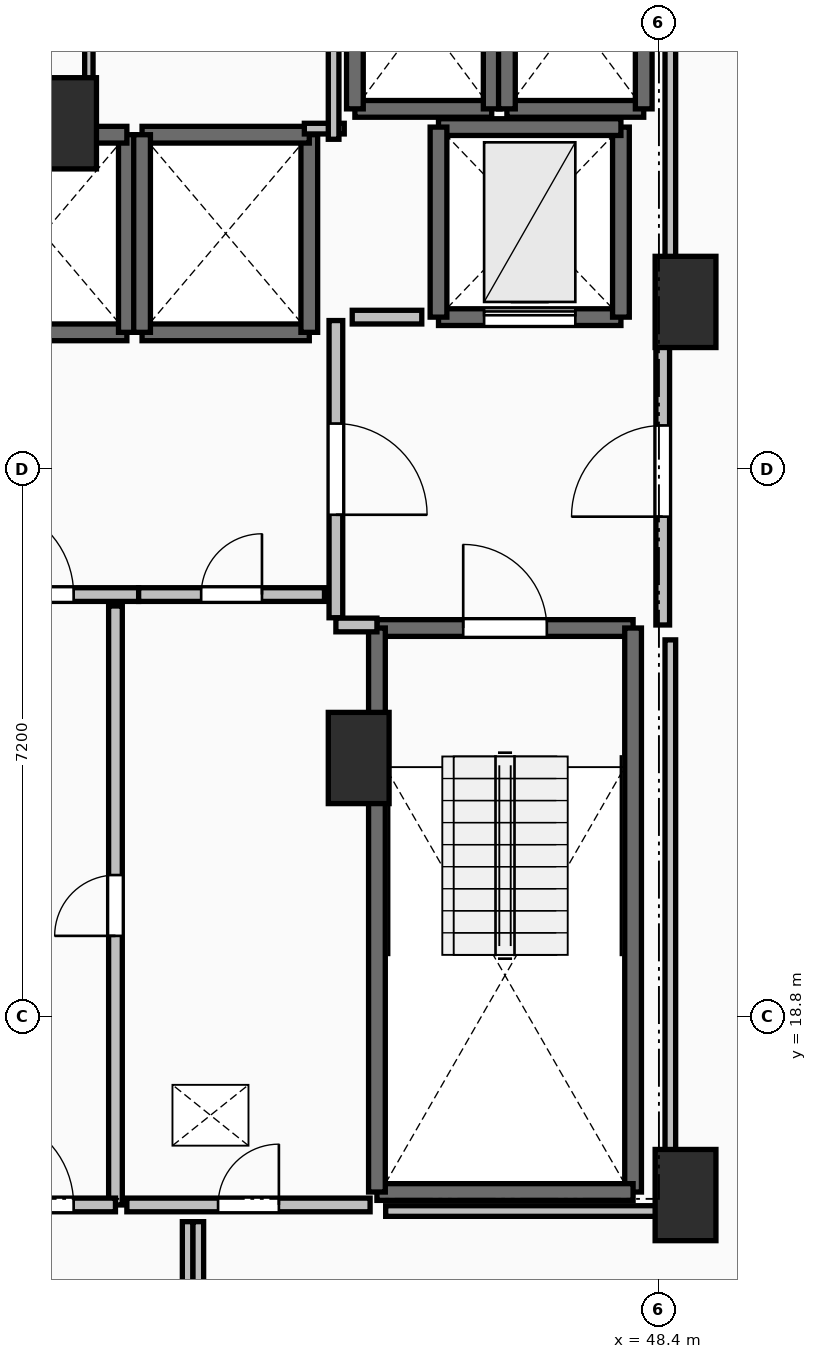
"""IFC4 building model, lengths in metres.
Left out: names, types, materials, properties, quantities, classifications, styles, units other than length and angle.
Written with IfcOpenShell. Run it as: python <this file> out.ifc"""

import sys

from ifc_helpers import new_model, si_unit, direction, frame, frame_2d, origin, origin_2d, place, context, subcontext, project, spatial, rectangle, extrude, element, fill, save


model = new_model("IFC4")
c1 = context("Model", 3, precision=1e-05, world=origin(), true_north=direction((0.0, 1.0)))
c2 = subcontext(c1, "Body", "Model", "MODEL_VIEW")
j1 = project(units=[si_unit("LENGTHUNIT", "METRE"), si_unit("PLANEANGLEUNIT", "RADIAN")], contexts=[c1])
p1 = place(None, origin())
s1 = spatial("IfcSite", under=j1, at=p1, CompositionType="ELEMENT")
p2 = place(p1, origin())
s2 = spatial("IfcBuilding", under=s1, at=p2, CompositionType="ELEMENT")
p3 = place(p2, frame((0.0, 0.0, 171.1)))
s3 = spatial("IfcBuildingStorey", under=s2, at=p3, CompositionType="ELEMENT", Elevation=171.1)
for number, where, z_axis, x_axis in (
    (1, (48.75, 28.2, 0.0), (0.0, 0.0, 1.0), (1.0, 0.0, 0.0)),
    (2, (48.75, 16.45, 0.0), (0.0, 0.0, 1.0), (1.0, 0.0, 0.0)),
    (3, (44.45, 22.2, 0.0), (0.0, 0.0, 1.0), (1.0, 0.0, 0.0)),
    (4, (40.6, 30.55, 0.0), (0.0, 0.0, 1.0), (1.0, 0.0, 0.0)),
):
    element("IfcColumn", number, at=place(p3, frame(where, z_axis=z_axis, x_axis=x_axis)), inside=s3, PredefinedType="PILASTER", context=c2, shape_type="SweptSolid", body=[
        extrude(rectangle(XDim=0.8, YDim=1.2, at=origin_2d()), origin(), (0.0, 0.0, 1.0), 3.5),
    ])
p4 = place(p3, frame((44.69, 23.91, 0.0), z_axis=(0.0, 0.0, 1.0), x_axis=(1.0, 0.0, 0.0)))
e5 = element("IfcWall", 5, at=p4, inside=s3, PredefinedType="SOLIDWALL", context=c2, shape_type="SweptSolid", body=[
    extrude(rectangle(XDim=3.37, YDim=0.22, at=frame_2d((1.685, 0.0))), origin(), (0.0, 0.0, 1.0), 3.2),
])
p5 = place(p4, frame((1.135, 0.0, 0.0)))
e6 = element("IfcOpeningElement", 6, at=p5, cuts=e5, PredefinedType="OPENING", context=c2, shape_type="SweptSolid", body=[
    extrude(rectangle(XDim=1.1, YDim=2.15, at=frame_2d((0.55, 1.075))), frame((0.0, 0.125, 0.0), z_axis=(0.0, -1.0, 0.0), x_axis=(1.0, 0.0, 0.0)), (0.0, 0.0, 1.0), 0.25),
])
p6 = place(p3, frame((48.06, 23.91, 0.0), z_axis=(0.0, 0.0, 1.0), x_axis=(0.0, -1.0, 0.0)))
e7 = element("IfcWall", 7, at=p6, inside=s3, PredefinedType="SOLIDWALL", context=c2, shape_type="SweptSolid", body=[
    extrude(rectangle(XDim=7.42, YDim=0.22, at=frame_2d((3.71, 0.0))), origin(), (0.0, 0.0, 1.0), 3.2),
])
p7 = place(p3, frame((48.06, 16.49, 0.0), z_axis=(0.0, 0.0, 1.0), x_axis=(-1.0, 0.0, 0.0)))
e8 = element("IfcWall", 8, at=p7, inside=s3, PredefinedType="SOLIDWALL", context=c2, shape_type="SweptSolid", body=[
    extrude(rectangle(XDim=3.37, YDim=0.22, at=frame_2d((1.685, 0.0))), origin(), (0.0, 0.0, 1.0), 3.2),
])
p8 = place(p3, frame((44.69, 16.49, 0.0), z_axis=(0.0, 0.0, 1.0), x_axis=(0.0, 1.0, 0.0)))
e9 = element("IfcWall", 9, at=p8, inside=s3, PredefinedType="SOLIDWALL", context=c2, shape_type="SweptSolid", body=[
    extrude(rectangle(XDim=7.42, YDim=0.22, at=frame_2d((3.71, 0.0))), origin(), (0.0, 0.0, 1.0), 3.2),
])
p9 = place(p3, frame((39.2, 27.8, 0.0), z_axis=(0.0, 0.0, 1.0), x_axis=(1.0, 0.0, 0.0)))
e10 = element("IfcWall", 10, at=p9, inside=s3, PredefinedType="SOLIDWALL", context=c2, shape_type="SweptSolid", body=[
    extrude(rectangle(XDim=2.2, YDim=0.22, at=frame_2d((1.1, 0.0))), origin(), (0.0, 0.0, 1.0), 3.2),
])
p10 = place(p3, frame((41.4, 27.8, 0.0), z_axis=(0.0, 0.0, 1.0), x_axis=(0.0, 1.0, 0.0)))
e11 = element("IfcWall", 11, at=p10, inside=s3, PredefinedType="SOLIDWALL", context=c2, shape_type="SweptSolid", body=[
    extrude(rectangle(XDim=2.6, YDim=0.22, at=frame_2d((1.3, 0.0))), origin(), (0.0, 0.0, 1.0), 3.2),
])
for number, where, z_axis, x_axis in (
    (12, (41.4, 30.4, 0.0), (0.0, 0.0, 1.0), (-1.0, 0.0, 0.0)),
    (13, (41.6, 27.8, 0.0), (0.0, 0.0, 1.0), (1.0, 0.0, 0.0)),
):
    element("IfcWall", number, at=place(p3, frame(where, z_axis=z_axis, x_axis=x_axis)), inside=s3, PredefinedType="SOLIDWALL", context=c2, shape_type="SweptSolid", body=[
        extrude(rectangle(XDim=2.2, YDim=0.22, at=frame_2d((1.1, 0.0))), origin(), (0.0, 0.0, 1.0), 3.2),
    ])
p11 = place(p3, frame((43.8, 27.8, 0.0), z_axis=(0.0, 0.0, 1.0), x_axis=(0.0, 1.0, 0.0)))
e14 = element("IfcWall", 14, at=p11, inside=s3, PredefinedType="SOLIDWALL", context=c2, shape_type="SweptSolid", body=[
    extrude(rectangle(XDim=2.6, YDim=0.22, at=frame_2d((1.3, 0.0))), origin(), (0.0, 0.0, 1.0), 3.2),
])
p12 = place(p3, frame((43.8, 30.4, 0.0), z_axis=(0.0, 0.0, 1.0), x_axis=(-1.0, 0.0, 0.0)))
e15 = element("IfcWall", 15, at=p12, inside=s3, PredefinedType="SOLIDWALL", context=c2, shape_type="SweptSolid", body=[
    extrude(rectangle(XDim=2.2, YDim=0.22, at=frame_2d((1.1, 0.0))), origin(), (0.0, 0.0, 1.0), 3.2),
])
p13 = place(p3, frame((41.6, 30.4, 0.0), z_axis=(0.0, 0.0, 1.0), x_axis=(0.0, -1.0, 0.0)))
e16 = element("IfcWall", 16, at=p13, inside=s3, PredefinedType="SOLIDWALL", context=c2, shape_type="SweptSolid", body=[
    extrude(rectangle(XDim=2.6, YDim=0.22, at=frame_2d((1.3, 0.0))), origin(), (0.0, 0.0, 1.0), 3.2),
])
p14 = place(p3, frame((44.4, 30.74, 0.0), z_axis=(0.0, 0.0, 1.0), x_axis=(1.0, 0.0, 0.0)))
e17 = element("IfcWall", 17, at=p14, inside=s3, PredefinedType="SOLIDWALL", context=c2, shape_type="SweptSolid", body=[
    extrude(rectangle(XDim=1.8, YDim=0.22, at=frame_2d((0.9, 0.0))), origin(), (0.0, 0.0, 1.0), 3.2),
])
for number, where, z_axis, x_axis in (
    (18, (46.2, 30.74, 0.0), (0.0, 0.0, 1.0), (0.0, 1.0, 0.0)),
    (19, (44.4, 33.16, 0.0), (0.0, 0.0, 1.0), (0.0, -1.0, 0.0)),
):
    element("IfcWall", number, at=place(p3, frame(where, z_axis=z_axis, x_axis=x_axis)), inside=s3, PredefinedType="SOLIDWALL", context=c2, shape_type="SweptSolid", body=[
        extrude(rectangle(XDim=2.42, YDim=0.22, at=frame_2d((1.21, 0.0))), origin(), (0.0, 0.0, 1.0), 3.2),
    ])
p15 = place(p3, frame((46.4, 30.74, 0.0), z_axis=(0.0, 0.0, 1.0), x_axis=(1.0, 0.0, 0.0)))
e20 = element("IfcWall", 20, at=p15, inside=s3, PredefinedType="SOLIDWALL", context=c2, shape_type="SweptSolid", body=[
    extrude(rectangle(XDim=1.8, YDim=0.22, at=frame_2d((0.9, 0.0))), origin(), (0.0, 0.0, 1.0), 3.2),
])
for number, where, z_axis, x_axis in (
    (21, (48.2, 30.74, 0.0), (0.0, 0.0, 1.0), (0.0, 1.0, 0.0)),
    (22, (46.4, 33.16, 0.0), (0.0, 0.0, 1.0), (0.0, -1.0, 0.0)),
):
    element("IfcWall", number, at=place(p3, frame(where, z_axis=z_axis, x_axis=x_axis)), inside=s3, PredefinedType="SOLIDWALL", context=c2, shape_type="SweptSolid", body=[
        extrude(rectangle(XDim=2.42, YDim=0.22, at=frame_2d((1.21, 0.0))), origin(), (0.0, 0.0, 1.0), 3.2),
    ])
p16 = place(p3, frame((45.5, 28.0, 0.0), z_axis=(0.0, 0.0, 1.0), x_axis=(1.0, 0.0, 0.0)))
e23 = element("IfcWall", 23, at=p16, inside=s3, PredefinedType="SHEAR", context=c2, shape_type="SweptSolid", body=[
    extrude(rectangle(XDim=2.4, YDim=0.22, at=frame_2d((1.2, 0.0))), origin(), (0.0, 0.0, 1.0), 3.2),
])
p17 = place(p16, frame((0.6, 0.0, 0.0)))
e24 = element("IfcOpeningElement", 24, at=p17, cuts=e23, PredefinedType="OPENING", context=c2, shape_type="SweptSolid", body=[
    extrude(rectangle(XDim=1.2, YDim=2.2, at=frame_2d((0.6, 1.1))), frame((0.0, 0.125, 0.0), z_axis=(0.0, -1.0, 0.0), x_axis=(1.0, 0.0, 0.0)), (0.0, 0.0, 1.0), 0.25),
])
p18 = place(p3, frame((47.9, 28.0, 0.0), z_axis=(0.0, 0.0, 1.0), x_axis=(0.0, 1.0, 0.0)))
e25 = element("IfcWall", 25, at=p18, inside=s3, PredefinedType="SHEAR", context=c2, shape_type="SweptSolid", body=[
    extrude(rectangle(XDim=2.5, YDim=0.22, at=frame_2d((1.25, 0.0))), origin(), (0.0, 0.0, 1.0), 3.2),
])
p19 = place(p3, frame((47.9, 30.5, 0.0), z_axis=(0.0, 0.0, 1.0), x_axis=(-1.0, 0.0, 0.0)))
e26 = element("IfcWall", 26, at=p19, inside=s3, PredefinedType="SHEAR", context=c2, shape_type="SweptSolid", body=[
    extrude(rectangle(XDim=2.4, YDim=0.22, at=frame_2d((1.2, 0.0))), origin(), (0.0, 0.0, 1.0), 3.2),
])
p20 = place(p3, frame((45.5, 30.5, 0.0), z_axis=(0.0, 0.0, 1.0), x_axis=(0.0, -1.0, 0.0)))
e27 = element("IfcWall", 27, at=p20, inside=s3, PredefinedType="SHEAR", context=c2, shape_type="SweptSolid", body=[
    extrude(rectangle(XDim=2.5, YDim=0.22, at=frame_2d((1.25, 0.0))), origin(), (0.0, 0.0, 1.0), 3.2),
])
p21 = place(p3, frame((44.15, 27.955, 0.0), z_axis=(0.0, 0.0, 1.0), x_axis=(0.0, -1.0, 0.0)))
e28 = element("IfcWall", 28, at=p21, inside=s3, PredefinedType="PARTITIONING", context=c2, shape_type="SweptSolid", body=[
    extrude(rectangle(XDim=3.91, YDim=0.18, at=frame_2d((1.955, 0.0))), origin(), (0.0, 0.0, 1.0), 3.2),
])
p22 = place(p21, frame((1.355, 0.0, 0.0)))
e29 = element("IfcOpeningElement", 29, at=p22, cuts=e28, PredefinedType="OPENING", context=c2, shape_type="SweptSolid", body=[
    extrude(rectangle(XDim=1.2, YDim=2.15, at=frame_2d((0.6, 1.075))), frame((0.0, 0.105, 0.0), z_axis=(0.0, -1.0, 0.0), x_axis=(1.0, 0.0, 0.0)), (0.0, 0.0, 1.0), 0.21),
])
p23 = place(p3, frame((44.15, 23.95, 0.0), z_axis=(0.0, 0.0, 1.0), x_axis=(1.0, 0.0, 0.0)))
e30 = element("IfcWall", 30, at=p23, inside=s3, PredefinedType="PARTITIONING", context=c2, shape_type="SweptSolid", body=[
    extrude(rectangle(XDim=0.54, YDim=0.18, at=frame_2d((0.27, 0.0))), origin(), (0.0, 0.0, 1.0), 3.2),
])
p24 = place(p3, frame((48.45, 23.95, 0.0), z_axis=(0.0, 0.0, 1.0), x_axis=(0.0, 1.0, 0.0)))
e31 = element("IfcWall", 31, at=p24, inside=s3, PredefinedType="PARTITIONING", context=c2, shape_type="SweptSolid", body=[
    extrude(rectangle(XDim=4.05, YDim=0.18, at=frame_2d((2.025, 0.0))), origin(), (0.0, 0.0, 1.0), 3.2),
])
p25 = place(p24, frame((1.425, 0.0, 0.0)))
e32 = element("IfcOpeningElement", 32, at=p25, cuts=e31, PredefinedType="OPENING", context=c2, shape_type="SweptSolid", body=[
    extrude(rectangle(XDim=1.2, YDim=2.15, at=frame_2d((0.6, 1.075))), frame((0.0, 0.105, 0.0), z_axis=(0.0, -1.0, 0.0), x_axis=(1.0, 0.0, 0.0)), (0.0, 0.0, 1.0), 0.21),
])
p26 = place(p3, frame((38.645, 24.35, 0.0), z_axis=(0.0, 0.0, 1.0), x_axis=(1.0, 0.0, 0.0)))
e33 = element("IfcWall", 33, at=p26, inside=s3, PredefinedType="PARTITIONING", context=c2, shape_type="SweptSolid", body=[
    extrude(rectangle(XDim=2.91, YDim=0.18, at=frame_2d((1.455, 0.0))), origin(), (0.0, 0.0, 1.0), 3.2),
])
p27 = place(p26, frame((0.855, 0.0, 0.0)))
e34 = element("IfcOpeningElement", 34, at=p27, cuts=e33, PredefinedType="OPENING", context=c2, shape_type="SweptSolid", body=[
    extrude(rectangle(XDim=1.2, YDim=2.15, at=frame_2d((0.6, 1.075))), frame((0.0, 0.105, 0.0), z_axis=(0.0, -1.0, 0.0), x_axis=(1.0, 0.0, 0.0)), (0.0, 0.0, 1.0), 0.21),
])
p28 = place(p3, frame((41.555, 24.35, 0.0), z_axis=(0.0, 0.0, 1.0), x_axis=(1.0, 0.0, 0.0)))
e35 = element("IfcWall", 35, at=p28, inside=s3, PredefinedType="PARTITIONING", context=c2, shape_type="SweptSolid", body=[
    extrude(rectangle(XDim=2.445, YDim=0.18, at=frame_2d((1.223, 0.0))), origin(), (0.0, 0.0, 1.0), 3.2),
])
p29 = place(p28, frame((0.823, 0.0, 0.0)))
e36 = element("IfcOpeningElement", 36, at=p29, cuts=e35, PredefinedType="OPENING", context=c2, shape_type="SweptSolid", body=[
    extrude(rectangle(XDim=0.8, YDim=2.05, at=frame_2d((0.4, 1.025))), frame((0.0, 0.105, 0.0), z_axis=(0.0, -1.0, 0.0), x_axis=(1.0, 0.0, 0.0)), (0.0, 0.0, 1.0), 0.21),
])
p30 = place(p3, frame((41.25, 16.32, 0.0), z_axis=(0.0, 0.0, 1.0), x_axis=(0.0, 1.0, 0.0)))
e37 = element("IfcWall", 37, at=p30, inside=s3, PredefinedType="PARTITIONING", context=c2, shape_type="SweptSolid", body=[
    extrude(rectangle(XDim=7.88, YDim=0.18, at=frame_2d((3.94, 0.0))), origin(), (0.0, 0.0, 1.0), 3.2),
])
p31 = place(p30, frame((3.54, 0.0, 0.0)))
e38 = element("IfcOpeningElement", 38, at=p31, cuts=e37, PredefinedType="OPENING", context=c2, shape_type="SweptSolid", body=[
    extrude(rectangle(XDim=0.8, YDim=2.05, at=frame_2d((0.4, 1.025))), frame((0.0, 0.105, 0.0), z_axis=(0.0, -1.0, 0.0), x_axis=(1.0, 0.0, 0.0)), (0.0, 0.0, 1.0), 0.21),
])
p32 = place(p3, frame((38.95, 16.32, 0.0), z_axis=(0.0, 0.0, 1.0), x_axis=(1.0, 0.0, 0.0)))
e39 = element("IfcWall", 39, at=p32, inside=s3, PredefinedType="PARTITIONING", context=c2, shape_type="SweptSolid", body=[
    extrude(rectangle(XDim=2.3, YDim=0.18, at=frame_2d((1.15, 0.0))), origin(), (0.0, 0.0, 1.0), 3.2),
])
p33 = place(p32, frame((0.55, 0.0, 0.0)))
e40 = element("IfcOpeningElement", 40, at=p33, cuts=e39, PredefinedType="OPENING", context=c2, shape_type="SweptSolid", body=[
    extrude(rectangle(XDim=1.2, YDim=2.15, at=frame_2d((0.6, 1.075))), frame((0.0, 0.105, 0.0), z_axis=(0.0, -1.0, 0.0), x_axis=(1.0, 0.0, 0.0)), (0.0, 0.0, 1.0), 0.21),
])
p34 = place(p3, frame((41.4, 16.32, 0.0), z_axis=(0.0, 0.0, 1.0), x_axis=(1.0, 0.0, 0.0)))
e41 = element("IfcWall", 41, at=p34, inside=s3, PredefinedType="PARTITIONING", context=c2, shape_type="SweptSolid", body=[
    extrude(rectangle(XDim=3.2, YDim=0.18, at=frame_2d((1.6, 0.0))), origin(), (0.0, 0.0, 1.0), 3.2),
])
p35 = place(p34, frame((1.2, 0.0, 0.0)))
e42 = element("IfcOpeningElement", 42, at=p35, cuts=e41, PredefinedType="OPENING", context=c2, shape_type="SweptSolid", body=[
    extrude(rectangle(XDim=0.8, YDim=2.05, at=frame_2d((0.4, 1.025))), frame((0.0, 0.105, 0.0), z_axis=(0.0, -1.0, 0.0), x_axis=(1.0, 0.0, 0.0)), (0.0, 0.0, 1.0), 0.21),
])
p36 = place(p3, frame((40.9, 30.34, 0.0), z_axis=(0.0, 0.0, 1.0), x_axis=(0.0, 1.0, 0.0)))
e43 = element("IfcWall", 43, at=p36, inside=s3, PredefinedType="PARTITIONING", context=c2, shape_type="SweptSolid", body=[
    extrude(rectangle(XDim=3.56, YDim=0.11, at=frame_2d((1.78, 0.0))), origin(), (0.0, 0.0, 1.0), 3.2),
])
p37 = place(p3, frame((45.28, 28.0, 0.0), z_axis=(0.0, 0.0, 1.0), x_axis=(-1.0, 0.0, 0.0)))
e44 = element("IfcWall", 44, at=p37, inside=s3, PredefinedType="PARTITIONING", context=c2, shape_type="SweptSolid", body=[
    extrude(rectangle(XDim=0.915, YDim=0.18, at=frame_2d((0.458, 0.0))), origin(), (0.0, 0.0, 1.0), 3.2),
])
p38 = place(p3, frame((43.735, 30.48, 0.0), z_axis=(0.0, 0.0, 1.0), x_axis=(1.0, 0.0, 0.0)))
e45 = element("IfcWall", 45, at=p38, inside=s3, PredefinedType="PARTITIONING", context=c2, shape_type="SweptSolid", body=[
    extrude(rectangle(XDim=0.525, YDim=0.14, at=frame_2d((0.262, 0.0))), origin(), (0.0, 0.0, 1.0), 3.2),
])
p39 = place(p3, frame((44.12, 30.34, 0.0), z_axis=(0.0, 0.0, 1.0), x_axis=(0.0, 1.0, 0.0)))
e46 = element("IfcWall", 46, at=p39, inside=s3, PredefinedType="PARTITIONING", context=c2, shape_type="SweptSolid", body=[
    extrude(rectangle(XDim=2.66, YDim=0.14, at=frame_2d((1.33, 0.0))), origin(), (0.0, 0.0, 1.0), 3.2),
])
p40 = place(p3, frame((48.55, 16.24, 0.0), z_axis=(0.0, 0.0, 1.0), x_axis=(0.0, 1.0, 0.0)))
e47 = element("IfcWall", 47, at=p40, inside=s3, PredefinedType="PARTITIONING", context=c2, shape_type="SweptSolid", body=[
    extrude(rectangle(XDim=7.514, YDim=0.14, at=frame_2d((3.757, 0.0))), origin(), (0.0, 0.0, 1.0), 2.392),
])
p41 = place(p3, frame((48.55, 28.196, 0.0), z_axis=(0.0, 0.0, 1.0), x_axis=(0.0, 1.0, 0.0)))
e48 = element("IfcWall", 48, at=p41, inside=s3, PredefinedType="PARTITIONING", context=c2, shape_type="SweptSolid", body=[
    extrude(rectangle(XDim=5.254, YDim=0.14, at=frame_2d((2.627, 0.0))), origin(), (0.0, 0.0, 1.0), 2.392),
])
for number, where, z_axis, x_axis in (
    (49, (42.2, 16.1, 0.0), (0.0, 0.0, 1.0), (0.0, -1.0, 0.0)),
    (50, (42.34, 14.27, 0.0), (0.0, 0.0, 1.0), (0.0, 1.0, 0.0)),
):
    element("IfcWall", number, at=place(p3, frame(where, z_axis=z_axis, x_axis=x_axis)), inside=s3, PredefinedType="PARTITIONING", context=c2, shape_type="SweptSolid", body=[
        extrude(rectangle(XDim=1.83, YDim=0.14, at=frame_2d((0.915, 0.0))), origin(), (0.0, 0.0, 1.0), 3.2),
    ])
p42 = place(p3, frame((44.805, 16.24, 0.0), z_axis=(0.0, 0.0, 1.0), x_axis=(1.0, 0.0, 0.0)))
e51 = element("IfcWall", 51, at=p42, inside=s3, PredefinedType="PARTITIONING", context=c2, shape_type="SweptSolid", body=[
    extrude(rectangle(XDim=3.745, YDim=0.14, at=frame_2d((1.873, 0.0))), origin(), (0.0, 0.0, 1.0), 2.392),
])
p43 = place(p5, origin())
e52 = element("IfcDoor", 52, at=p43, inside=s3, OperationType="SINGLE_SWING_LEFT", PredefinedType="DOOR", context=c2, shape_type="SweptSolid", body=[
    extrude(rectangle(XDim=1.1, YDim=2.15, at=frame_2d((0.55, 1.075))), frame((0.0, 0.025, 0.0), z_axis=(0.0, -1.0, 0.0), x_axis=(1.0, 0.0, 0.0)), (0.0, 0.0, 1.0), 0.05),
])
fill(e6, e52)
p44 = place(p17, origin())
e53 = element("IfcDoor", 53, at=p44, inside=s3, OperationType="SLIDING_TO_LEFT", PredefinedType="DOOR", context=c2, shape_type="SweptSolid", body=[
    extrude(rectangle(XDim=1.2, YDim=2.2, at=frame_2d((0.6, 1.1))), frame((0.0, 0.025, 0.0), z_axis=(0.0, -1.0, 0.0), x_axis=(1.0, 0.0, 0.0)), (0.0, 0.0, 1.0), 0.05),
])
fill(e24, e53)
p45 = place(p22, origin())
e54 = element("IfcDoor", 54, at=p45, inside=s3, OperationType="SINGLE_SWING_RIGHT", PredefinedType="DOOR", context=c2, shape_type="SweptSolid", body=[
    extrude(rectangle(XDim=1.2, YDim=2.15, at=frame_2d((0.6, 1.075))), frame((0.0, 0.025, 0.0), z_axis=(0.0, -1.0, 0.0), x_axis=(1.0, 0.0, 0.0)), (0.0, 0.0, 1.0), 0.05),
])
fill(e29, e54)
p46 = place(p25, origin())
e55 = element("IfcDoor", 55, at=p46, inside=s3, OperationType="SINGLE_SWING_LEFT", PredefinedType="DOOR", context=c2, shape_type="SweptSolid", body=[
    extrude(rectangle(XDim=1.2, YDim=2.15, at=frame_2d((0.6, 1.075))), frame((0.0, 0.025, 0.0), z_axis=(0.0, -1.0, 0.0), x_axis=(1.0, 0.0, 0.0)), (0.0, 0.0, 1.0), 0.05),
])
fill(e32, e55)
p47 = place(p27, origin())
e56 = element("IfcDoor", 56, at=p47, inside=s3, OperationType="SINGLE_SWING_LEFT", PredefinedType="DOOR", context=c2, shape_type="SweptSolid", body=[
    extrude(rectangle(XDim=1.2, YDim=2.15, at=frame_2d((0.6, 1.075))), frame((0.0, 0.025, 0.0), z_axis=(0.0, -1.0, 0.0), x_axis=(1.0, 0.0, 0.0)), (0.0, 0.0, 1.0), 0.05),
])
fill(e34, e56)
p48 = place(p29, origin())
e57 = element("IfcDoor", 57, at=p48, inside=s3, OperationType="SINGLE_SWING_RIGHT", PredefinedType="DOOR", context=c2, shape_type="SweptSolid", body=[
    extrude(rectangle(XDim=0.8, YDim=2.05, at=frame_2d((0.4, 1.025))), frame((0.0, 0.025, 0.0), z_axis=(0.0, -1.0, 0.0), x_axis=(1.0, 0.0, 0.0)), (0.0, 0.0, 1.0), 0.05),
])
fill(e36, e57)
p49 = place(p31, origin())
e58 = element("IfcDoor", 58, at=p49, inside=s3, OperationType="SINGLE_SWING_LEFT", PredefinedType="DOOR", context=c2, shape_type="SweptSolid", body=[
    extrude(rectangle(XDim=0.8, YDim=2.05, at=frame_2d((0.4, 1.025))), frame((0.0, 0.025, 0.0), z_axis=(0.0, -1.0, 0.0), x_axis=(1.0, 0.0, 0.0)), (0.0, 0.0, 1.0), 0.05),
])
fill(e38, e58)
p50 = place(p33, origin())
e59 = element("IfcDoor", 59, at=p50, inside=s3, OperationType="SINGLE_SWING_LEFT", PredefinedType="DOOR", context=c2, shape_type="SweptSolid", body=[
    extrude(rectangle(XDim=1.2, YDim=2.15, at=frame_2d((0.6, 1.075))), frame((0.0, 0.025, 0.0), z_axis=(0.0, -1.0, 0.0), x_axis=(1.0, 0.0, 0.0)), (0.0, 0.0, 1.0), 0.05),
])
fill(e40, e59)
p51 = place(p35, origin())
e60 = element("IfcDoor", 60, at=p51, inside=s3, OperationType="SINGLE_SWING_RIGHT", PredefinedType="DOOR", context=c2, shape_type="SweptSolid", body=[
    extrude(rectangle(XDim=0.8, YDim=2.05, at=frame_2d((0.4, 1.025))), frame((0.0, 0.025, 0.0), z_axis=(0.0, -1.0, 0.0), x_axis=(1.0, 0.0, 0.0)), (0.0, 0.0, 1.0), 0.05),
])
fill(e42, e60)
save(model, sys.argv[1])
